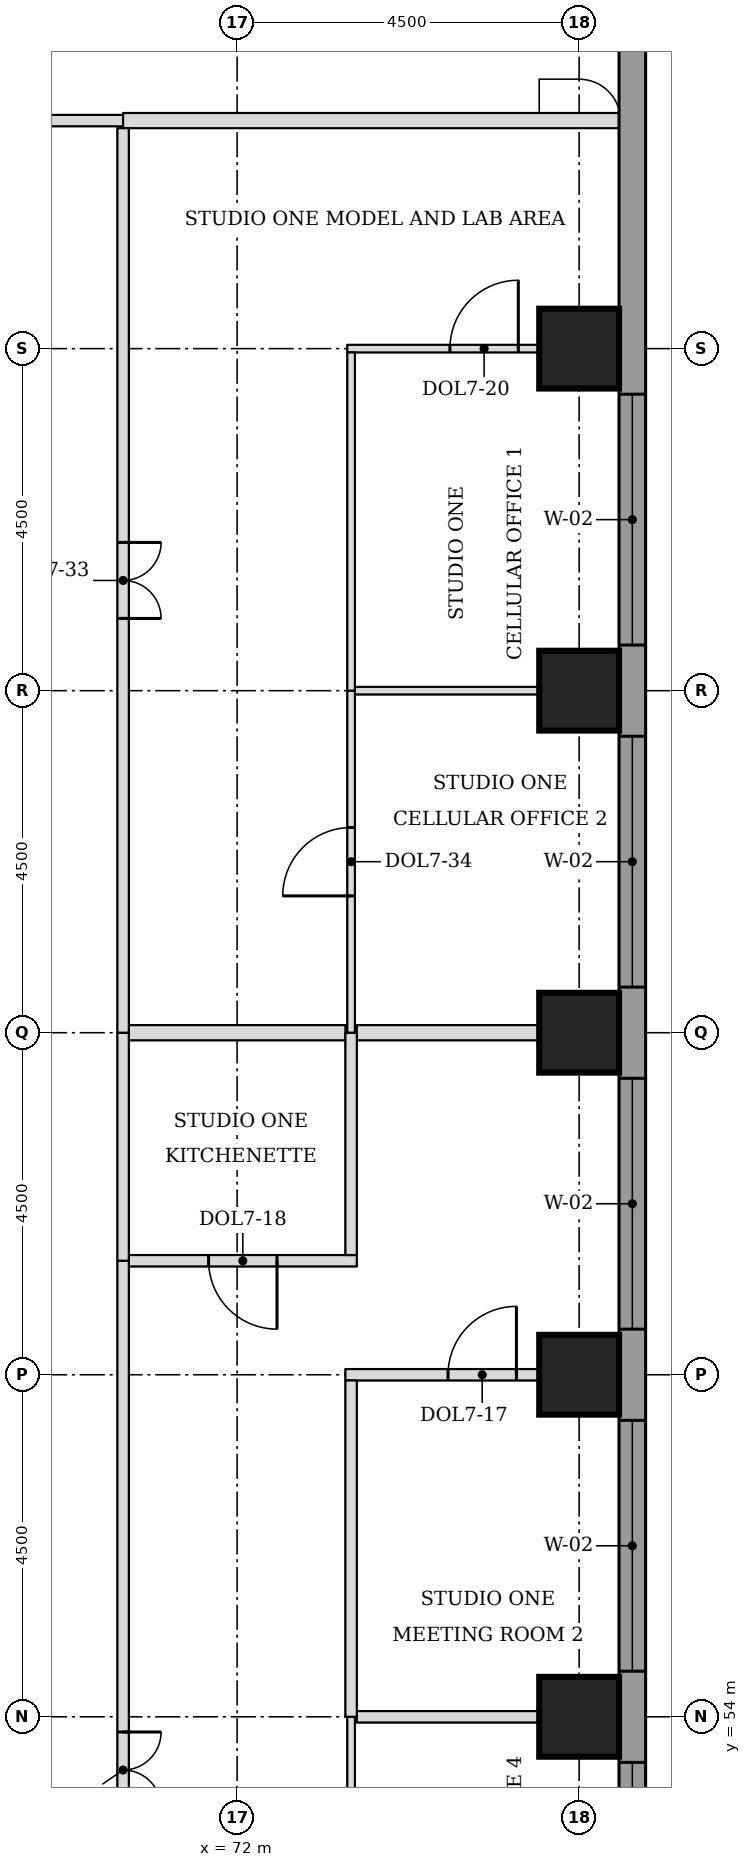
"""IFC4 building model, lengths in metres.
Left out: names, types, materials, properties, quantities, classifications, styles, units other than length and angle.
Written with IfcOpenShell. Run it as: python <this file> out.ifc"""

import sys

from ifc_helpers import new_model, si_unit, direction, frame, frame_2d, origin, origin_2d, place, context, subcontext, project, spatial, rectangle, extrude, element, fill, save


model = new_model("IFC4")
c1 = context("Model", 3, precision=1e-05, world=origin(), true_north=direction((0.0, 1.0)))
c2 = subcontext(c1, "Body", "Model", "MODEL_VIEW")
j1 = project(units=[si_unit("LENGTHUNIT", "METRE"), si_unit("PLANEANGLEUNIT", "RADIAN")], contexts=[c1])
p1 = place(None, origin())
s1 = spatial("IfcSite", under=j1, at=p1, CompositionType="ELEMENT")
p2 = place(p1, origin())
s2 = spatial("IfcBuilding", under=s1, at=p2, CompositionType="ELEMENT")
p3 = place(p2, frame((0.0, 0.0, 127.0)))
s3 = spatial("IfcBuildingStorey", under=s2, at=p3, CompositionType="ELEMENT", Elevation=127.0)
for number, where, z_axis, x_axis in (
    (1, (76.5, 54.0, 0.0), (0.0, 0.0, 1.0), (1.0, 0.0, 0.0)),
    (2, (76.5, 58.5, 0.0), (0.0, 0.0, 1.0), (1.0, 0.0, 0.0)),
    (3, (76.5, 63.0, 0.0), (0.0, 0.0, 1.0), (1.0, 0.0, 0.0)),
    (4, (76.5, 67.5, 0.0), (0.0, 0.0, 1.0), (1.0, 0.0, 0.0)),
    (5, (76.5, 72.0, 0.0), (0.0, 0.0, 1.0), (1.0, 0.0, 0.0)),
):
    element("IfcColumn", number, at=place(p3, frame(where, z_axis=z_axis, x_axis=x_axis)), inside=s3, PredefinedType="COLUMN", context=c2, shape_type="SweptSolid", body=[
        extrude(rectangle(XDim=1.05, YDim=1.05, at=origin_2d()), origin(), (0.0, 0.0, 1.0), 3.7),
    ])
p4 = place(p3, frame((77.2, 44.638, 0.0), z_axis=(0.0, 0.0, 1.0), x_axis=(0.0, 1.0, 0.0)))
e6 = element("IfcWall", 6, at=p4, inside=s3, PredefinedType="STANDARD", context=c2, shape_type="SweptSolid", body=[
    extrude(rectangle(XDim=32.225, YDim=0.35, at=frame_2d((16.112, 0.0))), origin(), (0.0, 0.0, 1.0), 3.525),
])
p5 = place(p4, frame((5.462, 0.0, 0.9)))
e7 = element("IfcOpeningElement", 7, at=p5, cuts=e6, PredefinedType="OPENING", context=c2, shape_type="SweptSolid", body=[
    extrude(rectangle(XDim=3.3, YDim=1.9, at=frame_2d((1.65, 0.95))), frame((0.0, 0.185, 0.0), z_axis=(0.0, -1.0, 0.0), x_axis=(1.0, 0.0, 0.0)), (0.0, 0.0, 1.0), 0.37),
])
p6 = place(p4, frame((9.962, 0.0, 0.9)))
e8 = element("IfcOpeningElement", 8, at=p6, cuts=e6, PredefinedType="OPENING", context=c2, shape_type="SweptSolid", body=[
    extrude(rectangle(XDim=3.3, YDim=1.9, at=frame_2d((1.65, 0.95))), frame((0.0, 0.185, 0.0), z_axis=(0.0, -1.0, 0.0), x_axis=(1.0, 0.0, 0.0)), (0.0, 0.0, 1.0), 0.37),
])
p7 = place(p4, frame((14.462, 0.0, 0.9)))
e9 = element("IfcOpeningElement", 9, at=p7, cuts=e6, PredefinedType="OPENING", context=c2, shape_type="SweptSolid", body=[
    extrude(rectangle(XDim=3.3, YDim=1.9, at=frame_2d((1.65, 0.95))), frame((0.0, 0.185, 0.0), z_axis=(0.0, -1.0, 0.0), x_axis=(1.0, 0.0, 0.0)), (0.0, 0.0, 1.0), 0.37),
])
p8 = place(p4, frame((18.962, 0.0, 0.9)))
e10 = element("IfcOpeningElement", 10, at=p8, cuts=e6, PredefinedType="OPENING", context=c2, shape_type="SweptSolid", body=[
    extrude(rectangle(XDim=3.3, YDim=1.9, at=frame_2d((1.65, 0.95))), frame((0.0, 0.185, 0.0), z_axis=(0.0, -1.0, 0.0), x_axis=(1.0, 0.0, 0.0)), (0.0, 0.0, 1.0), 0.37),
])
p9 = place(p4, frame((23.462, 0.0, 0.9)))
e11 = element("IfcOpeningElement", 11, at=p9, cuts=e6, PredefinedType="OPENING", context=c2, shape_type="SweptSolid", body=[
    extrude(rectangle(XDim=3.3, YDim=1.9, at=frame_2d((1.65, 0.95))), frame((0.0, 0.185, 0.0), z_axis=(0.0, -1.0, 0.0), x_axis=(1.0, 0.0, 0.0)), (0.0, 0.0, 1.0), 0.37),
])
p10 = place(p3, frame((73.575, 54.0, 0.0), z_axis=(0.0, 0.0, 1.0), x_axis=(1.0, 0.0, 0.0)))
e12 = element("IfcWall", 12, at=p10, inside=s3, PredefinedType="PARTITIONING", context=c2, shape_type="SweptSolid", body=[
    extrude(rectangle(XDim=3.45, YDim=0.15, at=frame_2d((1.725, 0.0))), origin(), (0.0, 0.0, 1.0), 3.55),
])
p11 = place(p3, frame((73.425, 58.5, 0.0), z_axis=(0.0, 0.0, 1.0), x_axis=(1.0, 0.0, 0.0)))
e13 = element("IfcWall", 13, at=p11, inside=s3, PredefinedType="PARTITIONING", context=c2, shape_type="SweptSolid", body=[
    extrude(rectangle(XDim=3.6, YDim=0.15, at=frame_2d((1.8, 0.0))), origin(), (0.0, 0.0, 1.0), 3.55),
])
p12 = place(p11, frame((1.35, 0.0, 0.0)))
e14 = element("IfcOpeningElement", 14, at=p12, cuts=e13, PredefinedType="OPENING", context=c2, shape_type="SweptSolid", body=[
    extrude(rectangle(XDim=0.9, YDim=2.1, at=frame_2d((0.45, 1.05))), frame((0.0, 0.085, 0.0), z_axis=(0.0, -1.0, 0.0), x_axis=(1.0, 0.0, 0.0)), (0.0, 0.0, 1.0), 0.17),
])
p13 = place(p3, frame((70.575, 60.0, 0.0), z_axis=(0.0, 0.0, 1.0), x_axis=(1.0, 0.0, 0.0)))
e15 = element("IfcWall", 15, at=p13, inside=s3, PredefinedType="PARTITIONING", context=c2, shape_type="SweptSolid", body=[
    extrude(rectangle(XDim=3.0, YDim=0.15, at=frame_2d((1.5, 0.0))), origin(), (0.0, 0.0, 1.0), 3.55),
])
p14 = place(p13, frame((1.05, 0.0, 0.0)))
e16 = element("IfcOpeningElement", 16, at=p14, cuts=e15, PredefinedType="OPENING", context=c2, shape_type="SweptSolid", body=[
    extrude(rectangle(XDim=0.9, YDim=2.1, at=frame_2d((0.45, 1.05))), frame((0.0, 0.085, 0.0), z_axis=(0.0, -1.0, 0.0), x_axis=(1.0, 0.0, 0.0)), (0.0, 0.0, 1.0), 0.17),
])
p15 = place(p3, frame((70.575, 63.0, 0.0), z_axis=(0.0, 0.0, 1.0), x_axis=(1.0, 0.0, 0.0)))
e17 = element("IfcWall", 17, at=p15, inside=s3, PredefinedType="PARTITIONING", context=c2, shape_type="SweptSolid", body=[
    extrude(rectangle(XDim=2.85, YDim=0.2, at=frame_2d((1.425, 0.0))), origin(), (0.0, 0.0, 1.0), 3.55),
])
p16 = place(p3, frame((73.575, 63.0, 0.0), z_axis=(0.0, 0.0, 1.0), x_axis=(1.0, 0.0, 0.0)))
e18 = element("IfcWall", 18, at=p16, inside=s3, PredefinedType="PARTITIONING", context=c2, shape_type="SweptSolid", body=[
    extrude(rectangle(XDim=3.45, YDim=0.2, at=frame_2d((1.725, 0.0))), origin(), (0.0, 0.0, 1.0), 3.55),
])
p17 = place(p3, frame((73.55, 67.5, 0.0), z_axis=(0.0, 0.0, 1.0), x_axis=(1.0, 0.0, 0.0)))
e19 = element("IfcWall", 19, at=p17, inside=s3, PredefinedType="PARTITIONING", context=c2, shape_type="SweptSolid", body=[
    extrude(rectangle(XDim=3.475, YDim=0.1, at=frame_2d((1.737, 0.0))), origin(), (0.0, 0.0, 1.0), 3.55),
])
p18 = place(p3, frame((73.45, 72.0, 0.0), z_axis=(0.0, 0.0, 1.0), x_axis=(1.0, 0.0, 0.0)))
e20 = element("IfcWall", 20, at=p18, inside=s3, PredefinedType="PARTITIONING", context=c2, shape_type="SweptSolid", body=[
    extrude(rectangle(XDim=3.575, YDim=0.1, at=frame_2d((1.788, 0.0))), origin(), (0.0, 0.0, 1.0), 3.55),
])
p19 = place(p18, frame((1.35, 0.0, 0.0)))
e21 = element("IfcOpeningElement", 21, at=p19, cuts=e20, PredefinedType="OPENING", context=c2, shape_type="SweptSolid", body=[
    extrude(rectangle(XDim=0.9, YDim=2.1, at=frame_2d((0.45, 1.05))), frame((0.0, 0.06, 0.0), z_axis=(0.0, -1.0, 0.0), x_axis=(1.0, 0.0, 0.0)), (0.0, 0.0, 1.0), 0.12),
])
p20 = place(p3, frame((58.5, 75.0, 0.0), z_axis=(0.0, 0.0, 1.0), x_axis=(1.0, 0.0, 0.0)))
e22 = element("IfcWall", 22, at=p20, inside=s3, PredefinedType="PARTITIONING", context=c2, shape_type="SweptSolid", body=[
    extrude(rectangle(XDim=12.0, YDim=0.15, at=frame_2d((6.0, 0.0))), origin(), (0.0, 0.0, 1.0), 3.55),
])
p21 = place(p20, frame((5.5, 0.0, 0.0)))
e23 = element("IfcOpeningElement", 23, at=p21, cuts=e22, PredefinedType="OPENING", context=c2, shape_type="SweptSolid", body=[
    extrude(rectangle(XDim=1.0, YDim=2.1, at=frame_2d((0.5, 1.05))), frame((0.0, 0.085, 0.0), z_axis=(0.0, -1.0, 0.0), x_axis=(1.0, 0.0, 0.0)), (0.0, 0.0, 1.0), 0.17),
])
p22 = place(p3, frame((70.5, 75.0, 0.0), z_axis=(0.0, 0.0, 1.0), x_axis=(1.0, 0.0, 0.0)))
e24 = element("IfcWall", 24, at=p22, inside=s3, PredefinedType="PARTITIONING", context=c2, shape_type="SweptSolid", body=[
    extrude(rectangle(XDim=6.525, YDim=0.2, at=frame_2d((3.262, 0.0))), origin(), (0.0, 0.0, 1.0), 3.55),
])
p23 = place(p3, frame((70.5, 46.6, 0.0), z_axis=(0.0, 0.0, 1.0), x_axis=(0.0, 1.0, 0.0)))
e25 = element("IfcWall", 25, at=p23, inside=s3, PredefinedType="PARTITIONING", context=c2, shape_type="SweptSolid", body=[
    extrude(rectangle(XDim=13.4, YDim=0.15, at=frame_2d((6.7, 0.0))), origin(), (0.0, 0.0, 1.0), 3.55),
])
p24 = place(p23, frame((6.2, 0.0, 0.0)))
e26 = element("IfcOpeningElement", 26, at=p24, cuts=e25, PredefinedType="OPENING", context=c2, shape_type="SweptSolid", body=[
    extrude(rectangle(XDim=1.0, YDim=2.1, at=frame_2d((0.5, 1.05))), frame((0.0, 0.085, 0.0), z_axis=(0.0, -1.0, 0.0), x_axis=(1.0, 0.0, 0.0)), (0.0, 0.0, 1.0), 0.17),
])
p25 = place(p3, frame((73.5, 49.55, 0.0), z_axis=(0.0, 0.0, 1.0), x_axis=(0.0, 1.0, 0.0)))
e27 = element("IfcWall", 27, at=p25, inside=s3, PredefinedType="PARTITIONING", context=c2, shape_type="SweptSolid", body=[
    extrude(rectangle(XDim=4.45, YDim=0.1, at=frame_2d((2.225, 0.0))), origin(), (0.0, 0.0, 1.0), 3.55),
])
p26 = place(p3, frame((73.5, 54.0, 0.0), z_axis=(0.0, 0.0, 1.0), x_axis=(0.0, 1.0, 0.0)))
e28 = element("IfcWall", 28, at=p26, inside=s3, PredefinedType="PARTITIONING", context=c2, shape_type="SweptSolid", body=[
    extrude(rectangle(XDim=4.425, YDim=0.15, at=frame_2d((2.212, 0.0))), origin(), (0.0, 0.0, 1.0), 3.55),
])
p27 = place(p3, frame((70.5, 60.0, 0.0), z_axis=(0.0, 0.0, 1.0), x_axis=(0.0, 1.0, 0.0)))
e29 = element("IfcWall", 29, at=p27, inside=s3, PredefinedType="PARTITIONING", context=c2, shape_type="SweptSolid", body=[
    extrude(rectangle(XDim=3.0, YDim=0.15, at=frame_2d((1.5, 0.0))), origin(), (0.0, 0.0, 1.0), 3.55),
])
p28 = place(p3, frame((73.5, 60.075, 0.0), z_axis=(0.0, 0.0, 1.0), x_axis=(0.0, 1.0, 0.0)))
e30 = element("IfcWall", 30, at=p28, inside=s3, PredefinedType="PARTITIONING", context=c2, shape_type="SweptSolid", body=[
    extrude(rectangle(XDim=2.925, YDim=0.15, at=frame_2d((1.462, 0.0))), origin(), (0.0, 0.0, 1.0), 3.55),
])
p29 = place(p3, frame((70.5, 63.0, 0.0), z_axis=(0.0, 0.0, 1.0), x_axis=(0.0, 1.0, 0.0)))
e31 = element("IfcWall", 31, at=p29, inside=s3, PredefinedType="PARTITIONING", context=c2, shape_type="SweptSolid", body=[
    extrude(rectangle(XDim=11.9, YDim=0.15, at=frame_2d((5.95, 0.0))), origin(), (0.0, 0.0, 1.0), 3.55),
])
p30 = place(p29, frame((5.45, 0.0, 0.0)))
e32 = element("IfcOpeningElement", 32, at=p30, cuts=e31, PredefinedType="OPENING", context=c2, shape_type="SweptSolid", body=[
    extrude(rectangle(XDim=1.0, YDim=2.1, at=frame_2d((0.5, 1.05))), frame((0.0, 0.085, 0.0), z_axis=(0.0, -1.0, 0.0), x_axis=(1.0, 0.0, 0.0)), (0.0, 0.0, 1.0), 0.17),
])
p31 = place(p3, frame((73.5, 63.0, 0.0), z_axis=(0.0, 0.0, 1.0), x_axis=(0.0, 1.0, 0.0)))
e33 = element("IfcWall", 33, at=p31, inside=s3, PredefinedType="PARTITIONING", context=c2, shape_type="SweptSolid", body=[
    extrude(rectangle(XDim=4.5, YDim=0.1, at=frame_2d((2.25, 0.0))), origin(), (0.0, 0.0, 1.0), 3.55),
])
p32 = place(p31, frame((1.8, 0.0, 0.0)))
e34 = element("IfcOpeningElement", 34, at=p32, cuts=e33, PredefinedType="OPENING", context=c2, shape_type="SweptSolid", body=[
    extrude(rectangle(XDim=0.9, YDim=2.1, at=frame_2d((0.45, 1.05))), frame((0.0, 0.06, 0.0), z_axis=(0.0, -1.0, 0.0), x_axis=(1.0, 0.0, 0.0)), (0.0, 0.0, 1.0), 0.12),
])
p33 = place(p3, frame((73.5, 67.5, 0.0), z_axis=(0.0, 0.0, 1.0), x_axis=(0.0, 1.0, 0.0)))
e35 = element("IfcWall", 35, at=p33, inside=s3, PredefinedType="PARTITIONING", context=c2, shape_type="SweptSolid", body=[
    extrude(rectangle(XDim=4.45, YDim=0.1, at=frame_2d((2.225, 0.0))), origin(), (0.0, 0.0, 1.0), 3.55),
])
p34 = place(p5, origin())
e36 = element("IfcWindow", 36, at=p34, inside=s3, PartitioningType="SINGLE_PANEL", PredefinedType="WINDOW", context=c2, shape_type="SweptSolid", body=[
    extrude(rectangle(XDim=3.3, YDim=1.9, at=frame_2d((1.65, 0.95))), frame((0.0, 0.085, 0.0), z_axis=(0.0, -1.0, 0.0), x_axis=(1.0, 0.0, 0.0)), (0.0, 0.0, 1.0), 0.06),
])
fill(e7, e36)
p35 = place(p6, origin())
e37 = element("IfcWindow", 37, at=p35, inside=s3, PartitioningType="SINGLE_PANEL", PredefinedType="WINDOW", context=c2, shape_type="SweptSolid", body=[
    extrude(rectangle(XDim=3.3, YDim=1.9, at=frame_2d((1.65, 0.95))), frame((0.0, 0.085, 0.0), z_axis=(0.0, -1.0, 0.0), x_axis=(1.0, 0.0, 0.0)), (0.0, 0.0, 1.0), 0.06),
])
fill(e8, e37)
p36 = place(p7, origin())
e38 = element("IfcWindow", 38, at=p36, inside=s3, PartitioningType="SINGLE_PANEL", PredefinedType="WINDOW", context=c2, shape_type="SweptSolid", body=[
    extrude(rectangle(XDim=3.3, YDim=1.9, at=frame_2d((1.65, 0.95))), frame((0.0, 0.085, 0.0), z_axis=(0.0, -1.0, 0.0), x_axis=(1.0, 0.0, 0.0)), (0.0, 0.0, 1.0), 0.06),
])
fill(e9, e38)
p37 = place(p8, origin())
e39 = element("IfcWindow", 39, at=p37, inside=s3, PartitioningType="SINGLE_PANEL", PredefinedType="WINDOW", context=c2, shape_type="SweptSolid", body=[
    extrude(rectangle(XDim=3.3, YDim=1.9, at=frame_2d((1.65, 0.95))), frame((0.0, 0.085, 0.0), z_axis=(0.0, -1.0, 0.0), x_axis=(1.0, 0.0, 0.0)), (0.0, 0.0, 1.0), 0.06),
])
fill(e10, e39)
p38 = place(p9, origin())
e40 = element("IfcWindow", 40, at=p38, inside=s3, PartitioningType="SINGLE_PANEL", PredefinedType="WINDOW", context=c2, shape_type="SweptSolid", body=[
    extrude(rectangle(XDim=3.3, YDim=1.9, at=frame_2d((1.65, 0.95))), frame((0.0, 0.085, 0.0), z_axis=(0.0, -1.0, 0.0), x_axis=(1.0, 0.0, 0.0)), (0.0, 0.0, 1.0), 0.06),
])
fill(e11, e40)
p39 = place(p24, frame((1.0, 0.0, 0.0), z_axis=(0.0, 0.0, 1.0), x_axis=(-1.0, 0.0, 0.0)))
e41 = element("IfcDoor", 41, at=p39, inside=s3, OperationType="DOUBLE_DOOR_SINGLE_SWING", PredefinedType="DOOR", context=c2, shape_type="SweptSolid", body=[
    extrude(rectangle(XDim=1.0, YDim=2.1, at=frame_2d((0.5, 1.05))), frame((0.0, 0.025, 0.0), z_axis=(0.0, -1.0, 0.0), x_axis=(1.0, 0.0, 0.0)), (0.0, 0.0, 1.0), 0.05),
])
fill(e26, e41)
p40 = place(p14, frame((0.9, 0.0, 0.0), z_axis=(0.0, 0.0, 1.0), x_axis=(-1.0, 0.0, 0.0)))
e42 = element("IfcDoor", 42, at=p40, inside=s3, OperationType="SINGLE_SWING_LEFT", PredefinedType="DOOR", context=c2, shape_type="SweptSolid", body=[
    extrude(rectangle(XDim=0.9, YDim=2.1, at=frame_2d((0.45, 1.05))), frame((0.0, 0.025, 0.0), z_axis=(0.0, -1.0, 0.0), x_axis=(1.0, 0.0, 0.0)), (0.0, 0.0, 1.0), 0.05),
])
fill(e16, e42)
p41 = place(p12, origin())
e43 = element("IfcDoor", 43, at=p41, inside=s3, OperationType="SINGLE_SWING_RIGHT", PredefinedType="DOOR", context=c2, shape_type="SweptSolid", body=[
    extrude(rectangle(XDim=0.9, YDim=2.1, at=frame_2d((0.45, 1.05))), frame((0.0, 0.025, 0.0), z_axis=(0.0, -1.0, 0.0), x_axis=(1.0, 0.0, 0.0)), (0.0, 0.0, 1.0), 0.05),
])
fill(e14, e43)
p42 = place(p30, frame((1.0, 0.0, 0.0), z_axis=(0.0, 0.0, 1.0), x_axis=(-1.0, 0.0, 0.0)))
e44 = element("IfcDoor", 44, at=p42, inside=s3, OperationType="DOUBLE_DOOR_SINGLE_SWING", PredefinedType="DOOR", context=c2, shape_type="SweptSolid", body=[
    extrude(rectangle(XDim=1.0, YDim=2.1, at=frame_2d((0.5, 1.05))), frame((0.0, 0.025, 0.0), z_axis=(0.0, -1.0, 0.0), x_axis=(1.0, 0.0, 0.0)), (0.0, 0.0, 1.0), 0.05),
])
fill(e32, e44)
p43 = place(p32, origin())
e45 = element("IfcDoor", 45, at=p43, inside=s3, OperationType="SINGLE_SWING_LEFT", PredefinedType="DOOR", context=c2, shape_type="SweptSolid", body=[
    extrude(rectangle(XDim=0.9, YDim=2.1, at=frame_2d((0.45, 1.05))), frame((0.0, 0.025, 0.0), z_axis=(0.0, -1.0, 0.0), x_axis=(1.0, 0.0, 0.0)), (0.0, 0.0, 1.0), 0.05),
])
fill(e34, e45)
p44 = place(p19, origin())
e46 = element("IfcDoor", 46, at=p44, inside=s3, OperationType="SINGLE_SWING_RIGHT", PredefinedType="DOOR", context=c2, shape_type="SweptSolid", body=[
    extrude(rectangle(XDim=0.9, YDim=2.1, at=frame_2d((0.45, 1.05))), frame((0.0, 0.025, 0.0), z_axis=(0.0, -1.0, 0.0), x_axis=(1.0, 0.0, 0.0)), (0.0, 0.0, 1.0), 0.05),
])
fill(e21, e46)
save(model, sys.argv[1])
